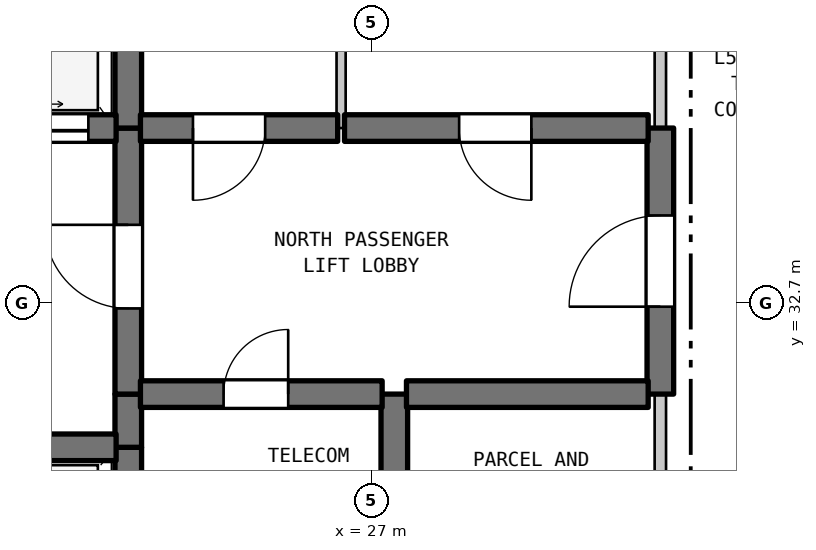
"""IFC4 building model, lengths in metres.
Left out: names, types, materials, properties, quantities, classifications, styles, units other than length and angle.
Written with IfcOpenShell. Run it as: python <this file> out.ifc"""

import sys

from ifc_helpers import new_model, si_unit, direction, frame, frame_2d, origin, place, context, subcontext, project, spatial, rectangle, extrude, element, fill, save


model = new_model("IFC4")
c1 = context("Model", 3, precision=1e-05, world=origin(), true_north=direction((0.0, 1.0)))
c2 = subcontext(c1, "Body", "Model", "MODEL_VIEW")
j1 = project(units=[si_unit("LENGTHUNIT", "METRE"), si_unit("PLANEANGLEUNIT", "RADIAN")], contexts=[c1])
p1 = place(None, origin())
s1 = spatial("IfcSite", under=j1, at=p1, CompositionType="ELEMENT")
p2 = place(p1, origin())
s2 = spatial("IfcBuilding", under=s1, at=p2, CompositionType="ELEMENT")
p3 = place(p2, frame((0.0, 0.0, 230.2)))
s3 = spatial("IfcBuildingStorey", under=s2, at=p3, CompositionType="ELEMENT", Elevation=230.2)
p4 = place(p3, frame((23.8, 29.5, 0.0), z_axis=(0.0, 0.0, 1.0), x_axis=(0.0, 1.0, 0.0)))
e1 = element("IfcWall", 1, at=p4, inside=s3, PredefinedType="SHEAR", context=c2, shape_type="SweptSolid", body=[
    extrude(rectangle(XDim=1.3, YDim=0.35, at=frame_2d((0.65, 0.0))), origin(), (0.0, 0.0, 1.0), 3.39),
])
p5 = place(p3, frame((23.8, 30.8, 0.0), z_axis=(0.0, 0.0, 1.0), x_axis=(0.0, 1.0, 0.0)))
e2 = element("IfcWall", 2, at=p5, inside=s3, PredefinedType="SHEAR", context=c2, shape_type="SweptSolid", body=[
    extrude(rectangle(XDim=0.7, YDim=0.35, at=frame_2d((0.35, 0.0))), origin(), (0.0, 0.0, 1.0), 3.39),
])
p6 = place(p3, frame((23.8, 31.5, 0.0), z_axis=(0.0, 0.0, 1.0), x_axis=(0.0, 1.0, 0.0)))
e3 = element("IfcWall", 3, at=p6, inside=s3, PredefinedType="SHEAR", context=c2, shape_type="SweptSolid", body=[
    extrude(rectangle(XDim=3.5, YDim=0.35, at=frame_2d((1.75, 0.0))), origin(), (0.0, 0.0, 1.0), 3.39),
])
p7 = place(p6, frame((1.127, 0.0, 0.0)))
e4 = element("IfcOpeningElement", 4, at=p7, cuts=e3, PredefinedType="OPENING", context=c2, shape_type="SweptSolid", body=[
    extrude(rectangle(XDim=1.1, YDim=2.15, at=frame_2d((0.55, 1.075))), frame((0.0, 0.185, 0.0), z_axis=(0.0, -1.0, 0.0), x_axis=(1.0, 0.0, 0.0)), (0.0, 0.0, 1.0), 0.37),
])
p8 = place(p3, frame((23.8, 35.0, 0.0), z_axis=(0.0, 0.0, 1.0), x_axis=(0.0, 1.0, 0.0)))
e5 = element("IfcWall", 5, at=p8, inside=s3, PredefinedType="SHEAR", context=c2, shape_type="SweptSolid", body=[
    extrude(rectangle(XDim=2.9, YDim=0.35, at=frame_2d((1.45, 0.0))), origin(), (0.0, 0.0, 1.0), 3.39),
])
p9 = place(p3, frame((26.6, 35.0, 0.0), z_axis=(0.0, 0.0, 1.0), x_axis=(0.0, 1.0, 0.0)))
e6 = element("IfcWall", 6, at=p9, inside=s3, PredefinedType="PARTITIONING", context=c2, shape_type="SweptSolid", body=[
    extrude(rectangle(XDim=2.9, YDim=0.12, at=frame_2d((1.45, 0.0))), origin(), (0.0, 0.0, 1.0), 3.39),
])
p10 = place(p3, frame((27.3, 29.5, 0.0), z_axis=(0.0, 0.0, 1.0), x_axis=(0.0, 1.0, 0.0)))
e7 = element("IfcWall", 7, at=p10, inside=s3, PredefinedType="SHEAR", context=c2, shape_type="SweptSolid", body=[
    extrude(rectangle(XDim=2.0, YDim=0.35, at=frame_2d((1.0, 0.0))), origin(), (0.0, 0.0, 1.0), 3.39),
])
p11 = place(p3, frame((30.8, 28.9, 0.0), z_axis=(0.0, 0.0, 1.0), x_axis=(0.0, 1.0, 0.0)))
e8 = element("IfcWall", 8, at=p11, inside=s3, PredefinedType="STANDARD", context=c2, shape_type="SweptSolid", body=[
    extrude(rectangle(XDim=2.6, YDim=0.15, at=frame_2d((1.3, 0.0))), origin(), (0.0, 0.0, 1.0), 3.39),
])
p12 = place(p3, frame((30.8, 31.5, 0.0), z_axis=(0.0, 0.0, 1.0), x_axis=(0.0, 1.0, 0.0)))
e9 = element("IfcWall", 9, at=p12, inside=s3, PredefinedType="SHEAR", context=c2, shape_type="SweptSolid", body=[
    extrude(rectangle(XDim=3.5, YDim=0.35, at=frame_2d((1.75, 0.0))), origin(), (0.0, 0.0, 1.0), 3.39),
])
p13 = place(p12, frame((1.15, 0.0, 0.0)))
e10 = element("IfcOpeningElement", 10, at=p13, cuts=e9, PredefinedType="OPENING", context=c2, shape_type="SweptSolid", body=[
    extrude(rectangle(XDim=1.2, YDim=2.2, at=frame_2d((0.6, 1.1))), frame((0.0, 0.185, 0.0), z_axis=(0.0, -1.0, 0.0), x_axis=(1.0, 0.0, 0.0)), (0.0, 0.0, 1.0), 0.37),
])
p14 = place(p3, frame((30.8, 35.0, 0.0), z_axis=(0.0, 0.0, 1.0), x_axis=(0.0, 1.0, 0.0)))
e11 = element("IfcWall", 11, at=p14, inside=s3, PredefinedType="STANDARD", context=c2, shape_type="SweptSolid", body=[
    extrude(rectangle(XDim=2.9, YDim=0.15, at=frame_2d((1.45, 0.0))), origin(), (0.0, 0.0, 1.0), 3.39),
])
p15 = place(p3, frame((19.16, 30.8, 0.0), z_axis=(0.0, 0.0, 1.0), x_axis=(1.0, 0.0, 0.0)))
e12 = element("IfcWall", 12, at=p15, inside=s3, PredefinedType="SHEAR", context=c2, shape_type="SweptSolid", body=[
    extrude(rectangle(XDim=4.48, YDim=0.35, at=frame_2d((2.24, 0.0))), origin(), (0.0, 0.0, 1.0), 3.39),
])
p16 = place(p3, frame((23.96, 31.5, 0.0), z_axis=(0.0, 0.0, 1.0), x_axis=(1.0, 0.0, 0.0)))
e13 = element("IfcWall", 13, at=p16, inside=s3, PredefinedType="SHEAR", context=c2, shape_type="SweptSolid", body=[
    extrude(rectangle(XDim=3.18, YDim=0.35, at=frame_2d((1.59, 0.0))), origin(), (0.0, 0.0, 1.0), 3.39),
])
p17 = place(p16, frame((1.094, 0.0, 0.0)))
e14 = element("IfcOpeningElement", 14, at=p17, cuts=e13, PredefinedType="OPENING", context=c2, shape_type="SweptSolid", body=[
    extrude(rectangle(XDim=0.85, YDim=2.1, at=frame_2d((0.425, 1.05))), frame((0.0, 0.185, 0.0), z_axis=(0.0, -1.0, 0.0), x_axis=(1.0, 0.0, 0.0)), (0.0, 0.0, 1.0), 0.37),
])
p18 = place(p3, frame((27.46, 31.5, 0.0), z_axis=(0.0, 0.0, 1.0), x_axis=(1.0, 0.0, 0.0)))
e15 = element("IfcWall", 15, at=p18, inside=s3, PredefinedType="SHEAR", context=c2, shape_type="SweptSolid", body=[
    extrude(rectangle(XDim=3.18, YDim=0.35, at=frame_2d((1.59, 0.0))), origin(), (0.0, 0.0, 1.0), 3.39),
])
p19 = place(p3, frame((19.16, 35.0, 0.0), z_axis=(0.0, 0.0, 1.0), x_axis=(1.0, 0.0, 0.0)))
e16 = element("IfcWall", 16, at=p19, inside=s3, PredefinedType="SHEAR", context=c2, shape_type="SweptSolid", body=[
    extrude(rectangle(XDim=4.48, YDim=0.35, at=frame_2d((2.24, 0.0))), origin(), (0.0, 0.0, 1.0), 3.39),
])
p20 = place(p19, frame((0.365, 0.0, 0.0)))
e17 = element("IfcOpeningElement", 17, at=p20, cuts=e16, PredefinedType="OPENING", context=c2, shape_type="SweptSolid", body=[
    extrude(rectangle(XDim=1.35, YDim=2.2, at=frame_2d((0.675, 1.1))), frame((0.0, 0.185, 0.0), z_axis=(0.0, -1.0, 0.0), x_axis=(1.0, 0.0, 0.0)), (0.0, 0.0, 1.0), 0.37),
])
p21 = place(p19, frame((2.765, 0.0, 0.0)))
e18 = element("IfcOpeningElement", 18, at=p21, cuts=e16, PredefinedType="OPENING", context=c2, shape_type="SweptSolid", body=[
    extrude(rectangle(XDim=1.35, YDim=2.2, at=frame_2d((0.675, 1.1))), frame((0.0, 0.185, 0.0), z_axis=(0.0, -1.0, 0.0), x_axis=(1.0, 0.0, 0.0)), (0.0, 0.0, 1.0), 0.37),
])
p22 = place(p3, frame((23.96, 35.0, 0.0), z_axis=(0.0, 0.0, 1.0), x_axis=(1.0, 0.0, 0.0)))
e19 = element("IfcWall", 19, at=p22, inside=s3, PredefinedType="SHEAR", context=c2, shape_type="SweptSolid", body=[
    extrude(rectangle(XDim=2.595, YDim=0.35, at=frame_2d((1.297, 0.0))), origin(), (0.0, 0.0, 1.0), 3.39),
])
p23 = place(p22, frame((0.691, 0.0, 0.0)))
e20 = element("IfcOpeningElement", 20, at=p23, cuts=e19, PredefinedType="OPENING", context=c2, shape_type="SweptSolid", body=[
    extrude(rectangle(XDim=0.95, YDim=2.15, at=frame_2d((0.475, 1.075))), frame((0.0, 0.185, 0.0), z_axis=(0.0, -1.0, 0.0), x_axis=(1.0, 0.0, 0.0)), (0.0, 0.0, 1.0), 0.37),
])
p24 = place(p3, frame((26.645, 35.0, 0.0), z_axis=(0.0, 0.0, 1.0), x_axis=(1.0, 0.0, 0.0)))
e21 = element("IfcWall", 21, at=p24, inside=s3, PredefinedType="SHEAR", context=c2, shape_type="SweptSolid", body=[
    extrude(rectangle(XDim=3.995, YDim=0.35, at=frame_2d((1.998, 0.0))), origin(), (0.0, 0.0, 1.0), 3.39),
])
p25 = place(p24, frame((1.508, 0.0, 0.0)))
e22 = element("IfcOpeningElement", 22, at=p25, cuts=e21, PredefinedType="OPENING", context=c2, shape_type="SweptSolid", body=[
    extrude(rectangle(XDim=0.95, YDim=2.15, at=frame_2d((0.475, 1.075))), frame((0.0, 0.185, 0.0), z_axis=(0.0, -1.0, 0.0), x_axis=(1.0, 0.0, 0.0)), (0.0, 0.0, 1.0), 0.37),
])
p26 = place(p7, origin())
e23 = element("IfcDoor", 23, at=p26, inside=s3, OperationType="SINGLE_SWING_RIGHT", PredefinedType="DOOR", context=c2, shape_type="SweptSolid", body=[
    extrude(rectangle(XDim=1.1, YDim=2.15, at=frame_2d((0.55, 1.075))), frame((0.0, 0.025, 0.0), z_axis=(0.0, -1.0, 0.0), x_axis=(1.0, 0.0, 0.0)), (0.0, 0.0, 1.0), 0.05),
])
fill(e4, e23)
p27 = place(p13, origin())
e24 = element("IfcDoor", 24, at=p27, inside=s3, OperationType="SINGLE_SWING_LEFT", PredefinedType="DOOR", context=c2, shape_type="SweptSolid", body=[
    extrude(rectangle(XDim=1.2, YDim=2.2, at=frame_2d((0.6, 1.1))), frame((0.0, 0.025, 0.0), z_axis=(0.0, -1.0, 0.0), x_axis=(1.0, 0.0, 0.0)), (0.0, 0.0, 1.0), 0.05),
])
fill(e10, e24)
p28 = place(p17, origin())
e25 = element("IfcDoor", 25, at=p28, inside=s3, OperationType="SINGLE_SWING_RIGHT", PredefinedType="DOOR", context=c2, shape_type="SweptSolid", body=[
    extrude(rectangle(XDim=0.85, YDim=2.1, at=frame_2d((0.425, 1.05))), frame((0.0, 0.025, 0.0), z_axis=(0.0, -1.0, 0.0), x_axis=(1.0, 0.0, 0.0)), (0.0, 0.0, 1.0), 0.05),
])
fill(e14, e25)
p29 = place(p21, origin())
e26 = element("IfcDoor", 26, at=p29, inside=s3, OperationType="DOUBLE_DOOR_SLIDING", PredefinedType="DOOR", context=c2, shape_type="SweptSolid", body=[
    extrude(rectangle(XDim=1.35, YDim=2.2, at=frame_2d((0.675, 1.1))), frame((0.0, 0.025, 0.0), z_axis=(0.0, -1.0, 0.0), x_axis=(1.0, 0.0, 0.0)), (0.0, 0.0, 1.0), 0.05),
])
fill(e18, e26)
p30 = place(p23, frame((0.95, 0.0, 0.0), z_axis=(0.0, 0.0, 1.0), x_axis=(-1.0, 0.0, 0.0)))
e27 = element("IfcDoor", 27, at=p30, inside=s3, OperationType="SINGLE_SWING_LEFT", PredefinedType="DOOR", context=c2, shape_type="SweptSolid", body=[
    extrude(rectangle(XDim=0.95, YDim=2.15, at=frame_2d((0.475, 1.075))), frame((0.0, 0.025, 0.0), z_axis=(0.0, -1.0, 0.0), x_axis=(1.0, 0.0, 0.0)), (0.0, 0.0, 1.0), 0.05),
])
fill(e20, e27)
p31 = place(p25, frame((0.95, 0.0, 0.0), z_axis=(0.0, 0.0, 1.0), x_axis=(-1.0, 0.0, 0.0)))
e28 = element("IfcDoor", 28, at=p31, inside=s3, OperationType="SINGLE_SWING_RIGHT", PredefinedType="DOOR", context=c2, shape_type="SweptSolid", body=[
    extrude(rectangle(XDim=0.95, YDim=2.15, at=frame_2d((0.475, 1.075))), frame((0.0, 0.025, 0.0), z_axis=(0.0, -1.0, 0.0), x_axis=(1.0, 0.0, 0.0)), (0.0, 0.0, 1.0), 0.05),
])
fill(e22, e28)
save(model, sys.argv[1])
